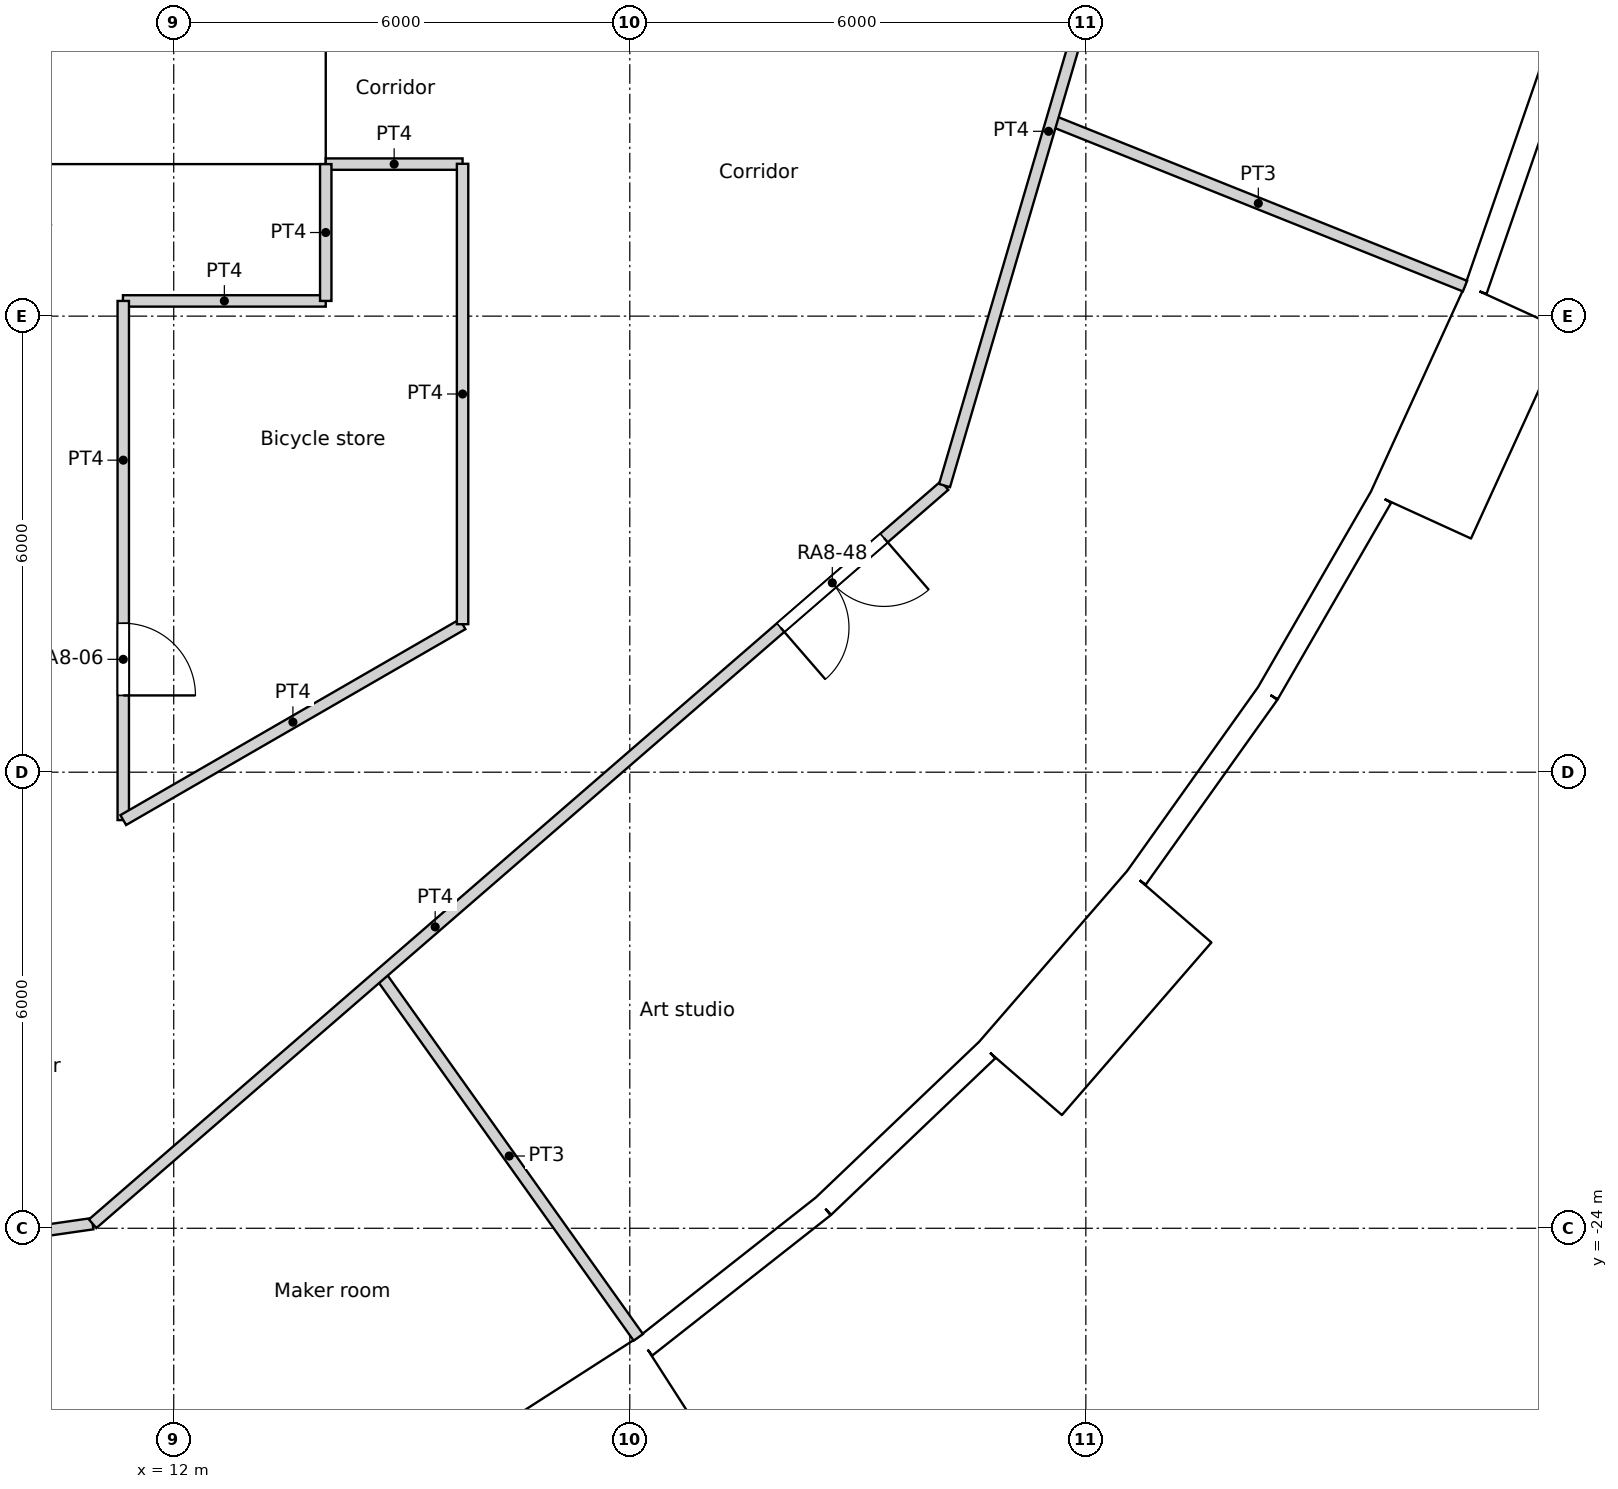
"""IFC4 building model, lengths in metres.
Left out: names, types, materials, properties, quantities, classifications, styles, units other than length and angle.
Written with IfcOpenShell. Run it as: python <this file> out.ifc"""

import sys

from ifc_helpers import new_model, si_unit, direction, frame, frame_2d, origin, origin_2d, place, context, subcontext, project, spatial, rectangle, circle, extrude, element, fill, save


model = new_model("IFC4")
c1 = context("Model", 3, precision=1e-05, world=origin(), true_north=direction((0.0, 1.0)))
c2 = subcontext(c1, "Body", "Model", "MODEL_VIEW")
j1 = project(units=[si_unit("LENGTHUNIT", "METRE"), si_unit("PLANEANGLEUNIT", "RADIAN")], contexts=[c1])
p1 = place(None, origin())
s1 = spatial("IfcSite", under=j1, at=p1, CompositionType="ELEMENT")
p2 = place(p1, origin())
s2 = spatial("IfcBuilding", under=s1, at=p2, CompositionType="ELEMENT")
p3 = place(p2, frame((0.0, 0.0, 103.8)))
s3 = spatial("IfcBuildingStorey", under=s2, at=p3, CompositionType="ELEMENT", Elevation=103.8)
for number, where, z_axis, x_axis in (
    (1, (17.561, -24.661, 0.0), (0.0, 0.0, 1.0), (1.0, 0.0, 0.0)),
    (2, (21.911, -20.892, 0.0), (0.0, 0.0, 1.0), (1.0, 0.0, 0.0)),
    (3, (25.469, -16.368, 0.0), (0.0, 0.0, 1.0), (1.0, 0.0, 0.0)),
    (4, (28.106, -11.252, 0.0), (0.0, 0.0, 1.0), (1.0, 0.0, 0.0)),
):
    element("IfcColumn", number, at=place(p3, frame(where, z_axis=z_axis, x_axis=x_axis)), inside=s3, PredefinedType="COLUMN", context=c2, shape_type="SweptSolid", body=[
        extrude(circle(Radius=0.6, at=origin_2d()), origin(), (0.0, 0.0, 1.0), 3.6),
    ])
for number, where, z_axis, x_axis in (
    (5, (14.659, -19.69, 0.0), (0.0, 0.0, 1.0), (1.0, 0.0, 0.0)),
    (6, (18.805, -15.779, 0.0), (0.0, 0.0, 1.0), (1.0, 0.0, 0.0)),
    (7, (21.937, -11.017, 0.0), (0.0, 0.0, 1.0), (1.0, 0.0, 0.0)),
):
    element("IfcColumn", number, at=place(p3, frame(where, z_axis=z_axis, x_axis=x_axis)), inside=s3, PredefinedType="COLUMN", context=c2, shape_type="SweptSolid", body=[
        extrude(circle(Radius=0.65, at=origin_2d()), origin(), (0.0, 0.0, 1.0), 3.6),
    ])
for number, where, z_axis, x_axis in (
    (8, (11.735, -14.716, 0.0), (0.0, 0.0, 1.0), (1.0, 0.0, 0.0)),
    (9, (15.552, -10.603, 0.0), (0.0, 0.0, 1.0), (1.0, 0.0, 0.0)),
):
    element("IfcColumn", number, at=place(p3, frame(where, z_axis=z_axis, x_axis=x_axis)), inside=s3, PredefinedType="COLUMN", context=c2, shape_type="SweptSolid", body=[
        extrude(circle(Radius=0.7, at=origin_2d()), origin(), (0.0, 0.0, 1.0), 3.6),
    ])
p4 = place(p3, frame((15.992, -27.659, -0.45), z_axis=(0.0, 0.0, 1.0), x_axis=(0.841223422347, 0.540687667415, 0.0)))
e10 = element("IfcWall", 10, at=p4, inside=s3, PredefinedType="ELEMENTEDWALL", context=c2, shape_type="SweptSolid", body=[
    extrude(rectangle(XDim=3.0, YDim=1.45, at=frame_2d((1.5, 0.0))), origin(), (0.0, 0.0, 1.0), 3.6),
])
p5 = place(p4, frame((1.5, 0.0, 2.0)))
e11 = element("IfcOpeningElement", 11, at=p5, cuts=e10, PredefinedType="OPENING", context=c2, shape_type="SweptSolid", body=[
    extrude(circle(Radius=0.9, at=origin_2d()), frame((0.0, 0.735, 0.0), z_axis=(0.0, -1.0, 0.0), x_axis=(1.0, 0.0, 0.0)), (0.0, 0.0, 1.0), 1.47),
])
p6 = place(p3, frame((18.204, -25.553, 0.0), z_axis=(0.0, 0.0, 1.0), x_axis=(0.786045331304, 0.618168858108, 0.0)))
e12 = element("IfcWall", 12, at=p6, inside=s3, PredefinedType="SOLIDWALL", context=c2, shape_type="SweptSolid", body=[
    extrude(rectangle(XDim=2.98, YDim=0.3, at=frame_2d((1.49, 0.0))), origin(), (0.0, 0.0, 1.0), 3.15),
])
p7 = place(p6, frame((1.49, 0.0, 1.55)))
e13 = element("IfcOpeningElement", 13, at=p7, cuts=e12, PredefinedType="OPENING", context=c2, shape_type="SweptSolid", body=[
    extrude(circle(Radius=0.9, at=origin_2d()), frame((0.0, 0.16, 0.0), z_axis=(0.0, -1.0, 0.0), x_axis=(1.0, 0.0, 0.0)), (0.0, 0.0, 1.0), 0.32),
])
p8 = place(p3, frame((20.546, -23.711, 0.0), z_axis=(0.0, 0.0, 1.0), x_axis=(0.723744206617, 0.690068346896, 0.0)))
e14 = element("IfcWall", 14, at=p8, inside=s3, PredefinedType="SOLIDWALL", context=c2, shape_type="SweptSolid", body=[
    extrude(rectangle(XDim=2.98, YDim=0.3, at=frame_2d((1.49, 0.0))), origin(), (0.0, 0.0, 1.0), 3.15),
])
p9 = place(p8, frame((1.49, 0.0, 1.55)))
e15 = element("IfcOpeningElement", 15, at=p9, cuts=e14, PredefinedType="OPENING", context=c2, shape_type="SweptSolid", body=[
    extrude(circle(Radius=0.9, at=origin_2d()), frame((0.0, 0.16, 0.0), z_axis=(0.0, -1.0, 0.0), x_axis=(1.0, 0.0, 0.0)), (0.0, 0.0, 1.0), 0.32),
])
p10 = place(p3, frame((23.137, -22.033, -0.45), z_axis=(0.0, 0.0, 1.0), x_axis=(0.654890259022, 0.75572398972, 0.0)))
e16 = element("IfcWall", 16, at=p10, inside=s3, PredefinedType="ELEMENTEDWALL", context=c2, shape_type="SweptSolid", body=[
    extrude(rectangle(XDim=3.0, YDim=1.45, at=frame_2d((1.5, 0.0))), origin(), (0.0, 0.0, 1.0), 3.6),
])
p11 = place(p10, frame((1.5, 0.0, 2.0)))
e17 = element("IfcOpeningElement", 17, at=p11, cuts=e16, PredefinedType="OPENING", context=c2, shape_type="SweptSolid", body=[
    extrude(circle(Radius=0.9, at=origin_2d()), frame((0.0, 0.735, 0.0), z_axis=(0.0, -1.0, 0.0), x_axis=(1.0, 0.0, 0.0)), (0.0, 0.0, 1.0), 1.47),
])
p12 = place(p3, frame((24.666, -19.389, 0.0), z_axis=(0.0, 0.0, 1.0), x_axis=(0.580059407678, 0.81457417315, 0.0)))
e18 = element("IfcWall", 18, at=p12, inside=s3, PredefinedType="SOLIDWALL", context=c2, shape_type="SweptSolid", body=[
    extrude(rectangle(XDim=2.979, YDim=0.3, at=frame_2d((1.49, 0.0))), origin(), (0.0, 0.0, 1.0), 3.15),
])
p13 = place(p12, frame((1.49, 0.0, 1.55)))
e19 = element("IfcOpeningElement", 19, at=p13, cuts=e18, PredefinedType="OPENING", context=c2, shape_type="SweptSolid", body=[
    extrude(circle(Radius=0.9, at=origin_2d()), frame((0.0, 0.16, 0.0), z_axis=(0.0, -1.0, 0.0), x_axis=(1.0, 0.0, 0.0)), (0.0, 0.0, 1.0), 0.32),
])
p14 = place(p3, frame((26.394, -16.962, 0.0), z_axis=(0.0, 0.0, 1.0), x_axis=(0.500025049464, 0.866010940986, 0.0)))
e20 = element("IfcWall", 20, at=p14, inside=s3, PredefinedType="SOLIDWALL", context=c2, shape_type="SweptSolid", body=[
    extrude(rectangle(XDim=2.98, YDim=0.3, at=frame_2d((1.49, 0.0))), origin(), (0.0, 0.0, 1.0), 3.15),
])
p15 = place(p14, frame((1.49, 0.0, 1.55)))
e21 = element("IfcOpeningElement", 21, at=p15, cuts=e20, PredefinedType="OPENING", context=c2, shape_type="SweptSolid", body=[
    extrude(circle(Radius=0.9, at=origin_2d()), frame((0.0, 0.16, 0.0), z_axis=(0.0, -1.0, 0.0), x_axis=(1.0, 0.0, 0.0)), (0.0, 0.0, 1.0), 0.32),
])
p16 = place(p3, frame((28.407, -14.622, -0.45), z_axis=(0.0, 0.0, 1.0), x_axis=(0.415427028395, 0.909626508012, 0.0)))
e22 = element("IfcWall", 22, at=p16, inside=s3, PredefinedType="ELEMENTEDWALL", context=c2, shape_type="SweptSolid", body=[
    extrude(rectangle(XDim=3.0, YDim=1.45, at=frame_2d((1.5, 0.0))), origin(), (0.0, 0.0, 1.0), 3.6),
])
p17 = place(p16, frame((1.5, 0.0, 2.0)))
e23 = element("IfcOpeningElement", 23, at=p17, cuts=e22, PredefinedType="OPENING", context=c2, shape_type="SweptSolid", body=[
    extrude(circle(Radius=0.9, at=origin_2d()), frame((0.0, 0.735, 0.0), z_axis=(0.0, -1.0, 0.0), x_axis=(1.0, 0.0, 0.0)), (0.0, 0.0, 1.0), 1.47),
])
p18 = place(p3, frame((29.129, -11.655, 0.0), z_axis=(0.0, 0.0, 1.0), x_axis=(0.327071167136, 0.944999709856, 0.0)))
e24 = element("IfcWall", 24, at=p18, inside=s3, PredefinedType="SOLIDWALL", context=c2, shape_type="SweptSolid", body=[
    extrude(rectangle(XDim=2.98, YDim=0.3, at=frame_2d((1.49, 0.0))), origin(), (0.0, 0.0, 1.0), 3.15),
])
p19 = place(p18, frame((1.49, 0.0, 1.55)))
e25 = element("IfcOpeningElement", 25, at=p19, cuts=e24, PredefinedType="OPENING", context=c2, shape_type="SweptSolid", body=[
    extrude(circle(Radius=0.9, at=origin_2d()), frame((0.0, 0.16, 0.0), z_axis=(0.0, -1.0, 0.0), x_axis=(1.0, 0.0, 0.0)), (0.0, 0.0, 1.0), 0.32),
])
p20 = place(p3, frame((-14.0, -9.4, 0.0), z_axis=(0.0, 0.0, 1.0), x_axis=(1.0, 0.0, 0.0)))
e26 = element("IfcWall", 26, at=p20, inside=s3, PredefinedType="SOLIDWALL", context=c2, shape_type="SweptSolid", body=[
    extrude(rectangle(XDim=28.0, YDim=1.2, at=frame_2d((14.0, 0.0))), origin(), (0.0, 0.0, 1.0), 3.6),
])
p21 = place(p20, frame((14.9, 0.0, 0.0)))
e27 = element("IfcOpeningElement", 27, at=p21, cuts=e26, PredefinedType="OPENING", context=c2, shape_type="SweptSolid", body=[
    extrude(rectangle(XDim=1.0, YDim=2.1, at=frame_2d((0.5, 1.05))), frame((0.0, 0.6, 0.0), z_axis=(0.0, -1.0, 0.0), x_axis=(1.0, 0.0, 0.0)), (0.0, 0.0, 1.0), 1.2),
])
p22 = place(p20, frame((9.8, 0.0, 0.0)))
e28 = element("IfcOpeningElement", 28, at=p22, cuts=e26, PredefinedType="OPENING", context=c2, shape_type="SweptSolid", body=[
    extrude(rectangle(XDim=1.8, YDim=2.1, at=frame_2d((0.9, 1.05))), frame((0.0, 0.6, 0.0), z_axis=(0.0, -1.0, 0.0), x_axis=(1.0, 0.0, 0.0)), (0.0, 0.0, 1.0), 1.2),
])
p23 = place(p20, frame((16.4, 0.0, 0.0)))
e29 = element("IfcOpeningElement", 29, at=p23, cuts=e26, PredefinedType="OPENING", context=c2, shape_type="SweptSolid", body=[
    extrude(rectangle(XDim=1.8, YDim=2.1, at=frame_2d((0.9, 1.05))), frame((0.0, 0.6, 0.0), z_axis=(0.0, -1.0, 0.0), x_axis=(1.0, 0.0, 0.0)), (0.0, 0.0, 1.0), 1.2),
])
p24 = place(p3, frame((13.4, -8.8, 0.0), z_axis=(0.0, 0.0, 1.0), x_axis=(0.0, 1.0, 0.0)))
e30 = element("IfcWall", 30, at=p24, inside=s3, PredefinedType="SOLIDWALL", context=c2, shape_type="SweptSolid", body=[
    extrude(rectangle(XDim=17.6, YDim=1.2, at=frame_2d((8.8, 0.0))), origin(), (0.0, 0.0, 1.0), 3.6),
])
p25 = place(p24, frame((6.3, 0.0, 0.0)))
e31 = element("IfcOpeningElement", 31, at=p25, cuts=e30, PredefinedType="OPENING", context=c2, shape_type="SweptSolid", body=[
    extrude(rectangle(XDim=1.0, YDim=2.1, at=frame_2d((0.5, 1.05))), frame((0.0, 0.6, 0.0), z_axis=(0.0, -1.0, 0.0), x_axis=(1.0, 0.0, 0.0)), (0.0, 0.0, 1.0), 1.2),
])
p26 = place(p3, frame((12.2, -8.8, 0.0), z_axis=(0.0, 0.0, 1.0), x_axis=(0.0, 1.0, 0.0)))
e32 = element("IfcWall", 32, at=p26, inside=s3, PredefinedType="SOLIDWALL", context=c2, shape_type="SweptSolid", body=[
    extrude(rectangle(XDim=4.1, YDim=1.2, at=frame_2d((2.05, 0.0))), origin(), (0.0, 0.0, 1.0), 3.15),
])
p27 = place(p3, frame((9.2, -8.2, 0.0), z_axis=(0.0, 0.0, 1.0), x_axis=(1.0, 0.0, 0.0)))
e33 = element("IfcWall", 33, at=p27, inside=s3, PredefinedType="SOLIDWALL", context=c2, shape_type="SweptSolid", body=[
    extrude(rectangle(XDim=2.4, YDim=1.2, at=frame_2d((1.2, 0.0))), origin(), (0.0, 0.0, 1.0), 3.15),
])
p28 = place(p3, frame((14.0, -11.8, 0.0), z_axis=(0.0, 0.0, 1.0), x_axis=(0.0, 1.0, 0.0)))
e34 = element("IfcWall", 34, at=p28, inside=s3, PredefinedType="PARTITIONING", context=c2, shape_type="SweptSolid", body=[
    extrude(rectangle(XDim=1.8, YDim=0.15, at=frame_2d((0.9, 0.0))), origin(), (0.0, 0.0, 1.0), 3.15),
])
p29 = place(p3, frame((11.332, -11.8, 0.0), z_axis=(0.0, 0.0, 1.0), x_axis=(1.0, 0.0, 0.0)))
e35 = element("IfcWall", 35, at=p29, inside=s3, PredefinedType="PARTITIONING", context=c2, shape_type="SweptSolid", body=[
    extrude(rectangle(XDim=2.668, YDim=0.15, at=frame_2d((1.334, 0.0))), origin(), (0.0, 0.0, 1.0), 3.15),
])
p30 = place(p3, frame((14.0, -10.0, 0.0), z_axis=(0.0, 0.0, 1.0), x_axis=(1.0, 0.0, 0.0)))
e36 = element("IfcWall", 36, at=p30, inside=s3, PredefinedType="PARTITIONING", context=c2, shape_type="SweptSolid", body=[
    extrude(rectangle(XDim=1.8, YDim=0.15, at=frame_2d((0.9, 0.0))), origin(), (0.0, 0.0, 1.0), 3.15),
])
p31 = place(p3, frame((15.8, -16.053, 0.0), z_axis=(0.0, 0.0, 1.0), x_axis=(0.0, 1.0, 0.0)))
e37 = element("IfcWall", 37, at=p31, inside=s3, PredefinedType="PARTITIONING", context=c2, shape_type="SweptSolid", body=[
    extrude(rectangle(XDim=6.057, YDim=0.15, at=frame_2d((3.028, 0.0))), origin(), (0.0, 0.0, 1.0), 3.15),
])
p32 = place(p3, frame((22.141, -14.229, 0.0), z_axis=(0.0, 0.0, 1.0), x_axis=(0.281745602308, 0.959489143024, 0.0)))
e38 = element("IfcWall", 38, at=p32, inside=s3, PredefinedType="PARTITIONING", context=c2, shape_type="SweptSolid", body=[
    extrude(rectangle(XDim=14.83, YDim=0.15, at=frame_2d((7.415, 0.0))), origin(), (0.0, 0.0, 1.0), 3.15),
])
p33 = place(p32, frame((9.765, 0.0, 0.0)))
e39 = element("IfcOpeningElement", 39, at=p33, cuts=e38, PredefinedType="OPENING", context=c2, shape_type="SweptSolid", body=[
    extrude(rectangle(XDim=1.0, YDim=2.04, at=frame_2d((0.5, 1.02))), frame((0.0, 0.075, 0.0), z_axis=(0.0, -1.0, 0.0), x_axis=(1.0, 0.0, 0.0)), (0.0, 0.0, 1.0), 0.15),
])
p34 = place(p3, frame((10.933, -23.94, 0.0), z_axis=(0.0, 0.0, 1.0), x_axis=(0.755770011705, 0.654837147242, 0.0)))
e40 = element("IfcWall", 40, at=p34, inside=s3, PredefinedType="PARTITIONING", context=c2, shape_type="SweptSolid", body=[
    extrude(rectangle(XDim=14.83, YDim=0.15, at=frame_2d((7.415, 0.0))), origin(), (0.0, 0.0, 1.0), 3.15),
])
p35 = place(p34, frame((11.976, 0.0, 0.0)))
e41 = element("IfcOpeningElement", 41, at=p35, cuts=e40, PredefinedType="OPENING", context=c2, shape_type="SweptSolid", body=[
    extrude(rectangle(XDim=1.8, YDim=2.1, at=frame_2d((0.9, 1.05))), frame((0.0, 0.075, 0.0), z_axis=(0.0, -1.0, 0.0), x_axis=(1.0, 0.0, 0.0)), (0.0, 0.0, 1.0), 0.15),
])
p36 = place(p3, frame((11.336, -18.63, 0.0), z_axis=(0.0, 0.0, 1.0), x_axis=(0.0, 1.0, 0.0)))
e42 = element("IfcWall", 42, at=p36, inside=s3, PredefinedType="PARTITIONING", context=c2, shape_type="SweptSolid", body=[
    extrude(rectangle(XDim=6.83, YDim=0.15, at=frame_2d((3.415, 0.0))), origin(), (0.0, 0.0, 1.0), 3.15),
])
p37 = place(p36, frame((1.64, 0.0, 0.0)))
e43 = element("IfcOpeningElement", 43, at=p37, cuts=e42, PredefinedType="OPENING", context=c2, shape_type="SweptSolid", body=[
    extrude(rectangle(XDim=0.95, YDim=2.1, at=frame_2d((0.475, 1.05))), frame((0.0, 0.075, 0.0), z_axis=(0.0, -1.0, 0.0), x_axis=(1.0, 0.0, 0.0)), (0.0, 0.0, 1.0), 0.15),
])
p38 = place(p3, frame((11.336, -18.63, 0.0), z_axis=(0.0, 0.0, 1.0), x_axis=(0.866063337164, 0.499934291702, 0.0)))
e44 = element("IfcWall", 44, at=p38, inside=s3, PredefinedType="PARTITIONING", context=c2, shape_type="SweptSolid", body=[
    extrude(rectangle(XDim=5.155, YDim=0.15, at=frame_2d((2.577, 0.0))), origin(), (0.0, 0.0, 1.0), 3.15),
])
p39 = place(p3, frame((-3.746, -26.051, 0.0), z_axis=(0.0, 0.0, 1.0), x_axis=(0.9898137179, 0.142368549395, 0.0)))
e45 = element("IfcWall", 45, at=p39, inside=s3, PredefinedType="PARTITIONING", context=c2, shape_type="SweptSolid", body=[
    extrude(rectangle(XDim=14.83, YDim=0.15, at=frame_2d((7.415, 0.0))), origin(), (0.0, 0.0, 1.0), 3.15),
])
p40 = place(p39, frame((0.804, 0.0, 0.0)))
e46 = element("IfcOpeningElement", 46, at=p40, cuts=e45, PredefinedType="OPENING", context=c2, shape_type="SweptSolid", body=[
    extrude(rectangle(XDim=1.0, YDim=2.04, at=frame_2d((0.5, 1.02))), frame((0.0, 0.075, 0.0), z_axis=(0.0, -1.0, 0.0), x_axis=(1.0, 0.0, 0.0)), (0.0, 0.0, 1.0), 0.15),
])
p41 = place(p39, frame((9.265, 0.0, 0.0)))
e47 = element("IfcOpeningElement", 47, at=p41, cuts=e45, PredefinedType="OPENING", context=c2, shape_type="SweptSolid", body=[
    extrude(rectangle(XDim=1.8, YDim=2.1, at=frame_2d((0.9, 1.05))), frame((0.0, 0.075, 0.0), z_axis=(0.0, -1.0, 0.0), x_axis=(1.0, 0.0, 0.0)), (0.0, 0.0, 1.0), 0.15),
])
p42 = place(p3, frame((14.715, -20.664, 0.0), z_axis=(0.0, 0.0, 1.0), x_axis=(0.580007254017, -0.814611309329, 0.0)))
e48 = element("IfcWall", 48, at=p42, inside=s3, PredefinedType="PARTITIONING", context=c2, shape_type="SweptSolid", body=[
    extrude(rectangle(XDim=5.857, YDim=0.15, at=frame_2d((2.928, 0.0))), origin(), (0.0, 0.0, 1.0), 3.15),
])
p43 = place(p3, frame((23.55, -9.428, 0.0), z_axis=(0.0, 0.0, 1.0), x_axis=(0.9283702981, -0.371656547911, 0.0)))
e49 = element("IfcWall", 49, at=p43, inside=s3, PredefinedType="PARTITIONING", context=c2, shape_type="SweptSolid", body=[
    extrude(rectangle(XDim=5.858, YDim=0.15, at=frame_2d((2.929, 0.0))), origin(), (0.0, 0.0, 1.0), 3.15),
])
p44 = place(p5, origin())
e50 = element("IfcWindow", 50, at=p44, inside=s3, PartitioningType="SINGLE_PANEL", PredefinedType="WINDOW", context=c2, shape_type="SweptSolid", body=[
    extrude(circle(Radius=0.9, at=origin_2d()), frame((0.0, 0.695, 0.0), z_axis=(0.0, -1.0, 0.0), x_axis=(1.0, 0.0, 0.0)), (0.0, 0.0, 1.0), 0.1),
])
fill(e11, e50)
p45 = place(p7, origin())
e51 = element("IfcWindow", 51, at=p45, inside=s3, PartitioningType="SINGLE_PANEL", PredefinedType="WINDOW", context=c2, shape_type="SweptSolid", body=[
    extrude(circle(Radius=0.9, at=origin_2d()), frame((0.0, 0.12, 0.0), z_axis=(0.0, -1.0, 0.0), x_axis=(1.0, 0.0, 0.0)), (0.0, 0.0, 1.0), 0.1),
])
fill(e13, e51)
p46 = place(p9, origin())
e52 = element("IfcWindow", 52, at=p46, inside=s3, PartitioningType="SINGLE_PANEL", PredefinedType="WINDOW", context=c2, shape_type="SweptSolid", body=[
    extrude(circle(Radius=0.9, at=origin_2d()), frame((0.0, 0.12, 0.0), z_axis=(0.0, -1.0, 0.0), x_axis=(1.0, 0.0, 0.0)), (0.0, 0.0, 1.0), 0.1),
])
fill(e15, e52)
p47 = place(p11, origin())
e53 = element("IfcWindow", 53, at=p47, inside=s3, PartitioningType="SINGLE_PANEL", PredefinedType="WINDOW", context=c2, shape_type="SweptSolid", body=[
    extrude(circle(Radius=0.9, at=origin_2d()), frame((0.0, 0.695, 0.0), z_axis=(0.0, -1.0, 0.0), x_axis=(1.0, 0.0, 0.0)), (0.0, 0.0, 1.0), 0.1),
])
fill(e17, e53)
p48 = place(p13, origin())
e54 = element("IfcWindow", 54, at=p48, inside=s3, PartitioningType="SINGLE_PANEL", PredefinedType="WINDOW", context=c2, shape_type="SweptSolid", body=[
    extrude(circle(Radius=0.9, at=origin_2d()), frame((0.0, 0.12, 0.0), z_axis=(0.0, -1.0, 0.0), x_axis=(1.0, 0.0, 0.0)), (0.0, 0.0, 1.0), 0.1),
])
fill(e19, e54)
p49 = place(p15, origin())
e55 = element("IfcWindow", 55, at=p49, inside=s3, PartitioningType="SINGLE_PANEL", PredefinedType="WINDOW", context=c2, shape_type="SweptSolid", body=[
    extrude(circle(Radius=0.9, at=origin_2d()), frame((0.0, 0.12, 0.0), z_axis=(0.0, -1.0, 0.0), x_axis=(1.0, 0.0, 0.0)), (0.0, 0.0, 1.0), 0.1),
])
fill(e21, e55)
p50 = place(p17, origin())
e56 = element("IfcWindow", 56, at=p50, inside=s3, PartitioningType="SINGLE_PANEL", PredefinedType="WINDOW", context=c2, shape_type="SweptSolid", body=[
    extrude(circle(Radius=0.9, at=origin_2d()), frame((0.0, 0.695, 0.0), z_axis=(0.0, -1.0, 0.0), x_axis=(1.0, 0.0, 0.0)), (0.0, 0.0, 1.0), 0.1),
])
fill(e23, e56)
p51 = place(p19, origin())
e57 = element("IfcWindow", 57, at=p51, inside=s3, PartitioningType="SINGLE_PANEL", PredefinedType="WINDOW", context=c2, shape_type="SweptSolid", body=[
    extrude(circle(Radius=0.9, at=origin_2d()), frame((0.0, 0.12, 0.0), z_axis=(0.0, -1.0, 0.0), x_axis=(1.0, 0.0, 0.0)), (0.0, 0.0, 1.0), 0.1),
])
fill(e25, e57)
p52 = place(p37, origin())
e58 = element("IfcDoor", 58, at=p52, inside=s3, OperationType="SINGLE_SWING_RIGHT", PredefinedType="DOOR", context=c2, shape_type="SweptSolid", body=[
    extrude(rectangle(XDim=0.95, YDim=2.1, at=frame_2d((0.475, 1.05))), frame((0.0, 0.025, 0.0), z_axis=(0.0, -1.0, 0.0), x_axis=(1.0, 0.0, 0.0)), (0.0, 0.0, 1.0), 0.05),
])
fill(e43, e58)
p53 = place(p35, origin())
e59 = element("IfcDoor", 59, at=p53, inside=s3, OperationType="DOUBLE_DOOR_SINGLE_SWING", PredefinedType="DOOR", context=c2, shape_type="SweptSolid", body=[
    extrude(rectangle(XDim=1.8, YDim=2.1, at=frame_2d((0.9, 1.05))), frame((0.0, 0.025, 0.0), z_axis=(0.0, -1.0, 0.0), x_axis=(1.0, 0.0, 0.0)), (0.0, 0.0, 1.0), 0.05),
])
fill(e41, e59)
save(model, sys.argv[1])
